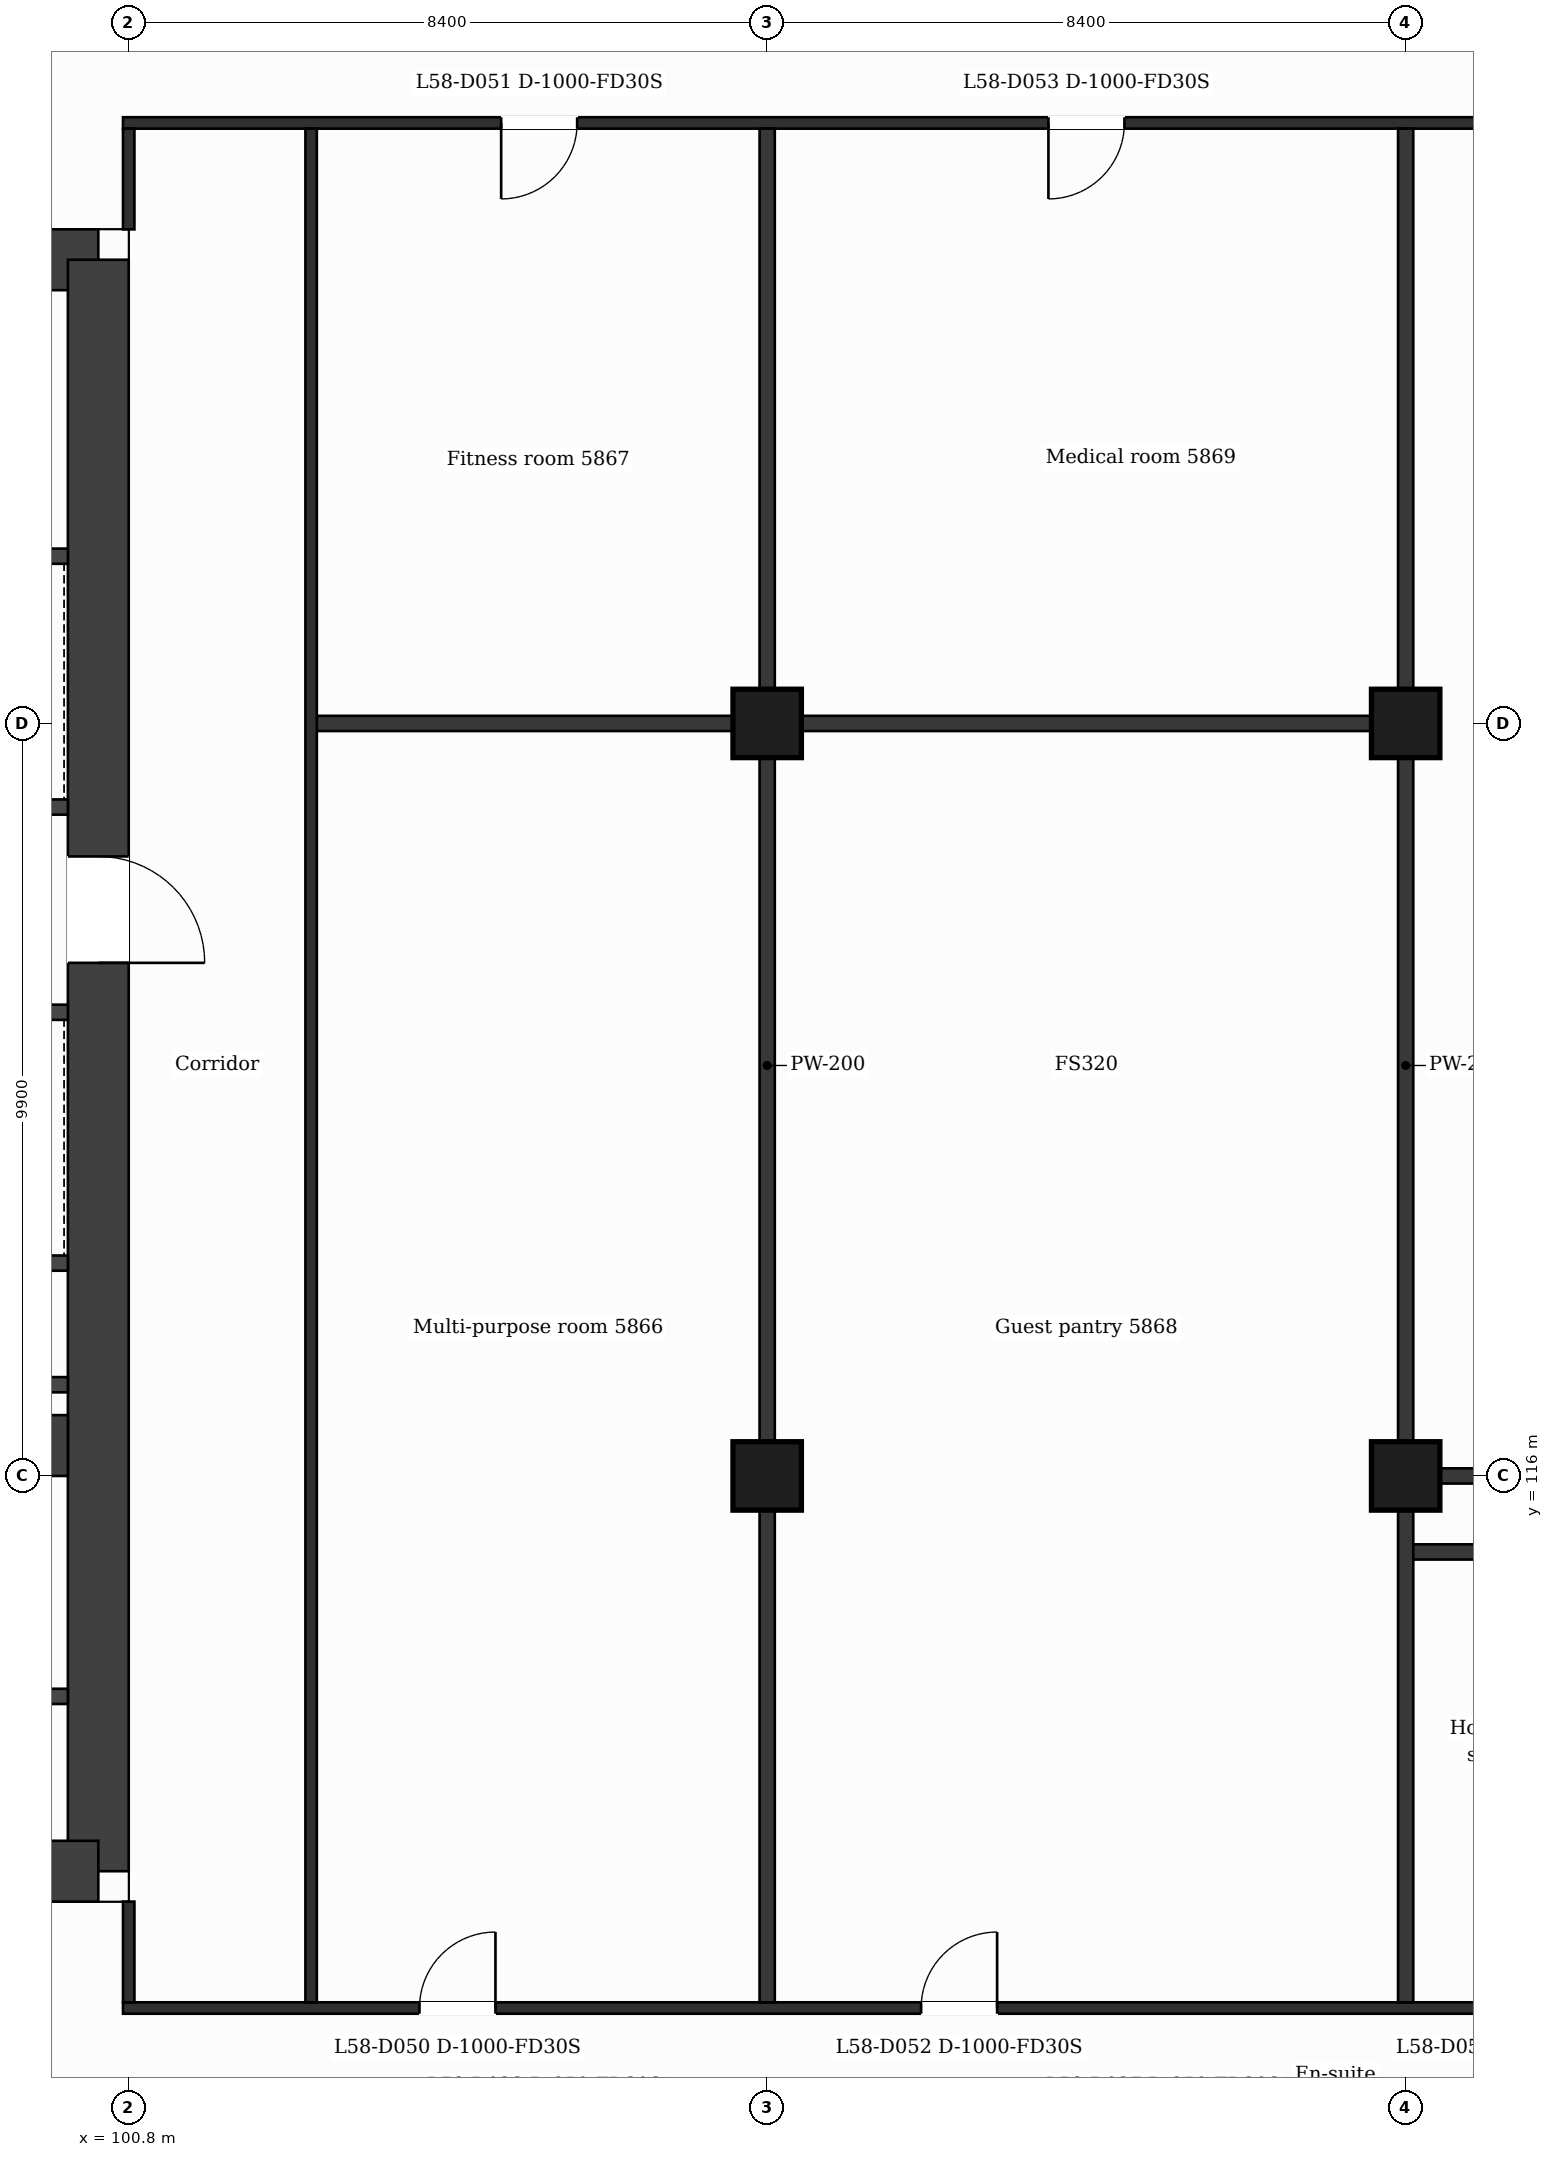
"""IFC4 building model, lengths in metres.
Left out: names, types, materials, properties, quantities, classifications, styles, units other than length and angle.
Written with IfcOpenShell. Run it as: python <this file> out.ifc"""

import sys

from ifc_helpers import new_model, si_unit, direction, frame, frame_2d, origin, origin_2d, place, context, subcontext, project, spatial, rectangle, extrude, element, fill, save


model = new_model("IFC4")
c1 = context("Model", 3, precision=1e-05, world=origin(), true_north=direction((0.0, 1.0)))
c2 = subcontext(c1, "Body", "Model", "MODEL_VIEW")
j1 = project(units=[si_unit("LENGTHUNIT", "METRE"), si_unit("PLANEANGLEUNIT", "RADIAN")], contexts=[c1])
p1 = place(None, origin())
s1 = spatial("IfcSite", under=j1, at=p1, CompositionType="ELEMENT")
p2 = place(p1, origin())
s2 = spatial("IfcBuilding", under=s1, at=p2, CompositionType="ELEMENT")
p3 = place(p2, frame((0.0, 0.0, 239.2)))
s3 = spatial("IfcBuildingStorey", under=s2, at=p3, CompositionType="ELEMENT", Elevation=239.2)
p4 = place(p3, frame((88.98, 132.0, 0.0), z_axis=(0.0, 0.0, 1.0), x_axis=(1.0, 0.0, 0.0)))
e1 = element("IfcWall", 1, at=p4, inside=s3, PredefinedType="SHEAR", context=c2, shape_type="SweptSolid", body=[
    extrude(rectangle(XDim=11.419, YDim=0.8, at=frame_2d((5.71, 0.0))), origin(), (0.0, 0.0, 1.0), 3.7),
])
p5 = place(p4, frame((6.833, 0.0, 0.0)))
e2 = element("IfcOpeningElement", 2, at=p5, cuts=e1, PredefinedType="OPENING", context=c2, shape_type="SweptSolid", body=[
    extrude(rectangle(XDim=1.2, YDim=2.1, at=frame_2d((0.6, 1.05))), frame((0.0, 0.41, 0.0), z_axis=(0.0, -1.0, 0.0), x_axis=(1.0, 0.0, 0.0)), (0.0, 0.0, 1.0), 0.82),
])
p6 = place(p3, frame((100.4, 132.0, 0.0), z_axis=(0.0, 0.0, 1.0), x_axis=(0.0, -1.0, 0.0)))
e3 = element("IfcWall", 3, at=p6, inside=s3, PredefinedType="SHEAR", context=c2, shape_type="SweptSolid", body=[
    extrude(rectangle(XDim=21.2, YDim=0.8, at=frame_2d((10.6, 0.0))), origin(), (0.0, 0.0, 1.0), 3.7),
])
p7 = place(p6, frame((7.85, 0.0, 0.0)))
e4 = element("IfcOpeningElement", 4, at=p7, cuts=e3, PredefinedType="OPENING", context=c2, shape_type="SweptSolid", body=[
    extrude(rectangle(XDim=1.4, YDim=2.1, at=frame_2d((0.7, 1.05))), frame((0.0, 0.41, 0.0), z_axis=(0.0, -1.0, 0.0), x_axis=(1.0, 0.0, 0.0)), (0.0, 0.0, 1.0), 0.82),
])
p8 = place(p3, frame((100.4, 110.8, 0.0), z_axis=(0.0, 0.0, 1.0), x_axis=(-1.0, 0.0, 0.0)))
e5 = element("IfcWall", 5, at=p8, inside=s3, PredefinedType="SHEAR", context=c2, shape_type="SweptSolid", body=[
    extrude(rectangle(XDim=14.273, YDim=0.8, at=frame_2d((7.137, 0.0))), origin(), (0.0, 0.0, 1.0), 3.7),
])
p9 = place(p8, frame((5.908, 0.0, 0.0)))
e6 = element("IfcOpeningElement", 6, at=p9, cuts=e5, PredefinedType="OPENING", context=c2, shape_type="SweptSolid", body=[
    extrude(rectangle(XDim=1.4, YDim=2.1, at=frame_2d((0.7, 1.05))), frame((0.0, 0.41, 0.0), z_axis=(0.0, -1.0, 0.0), x_axis=(1.0, 0.0, 0.0)), (0.0, 0.0, 1.0), 0.82),
])
p10 = place(p3, frame((94.7, 116.4, 0.0), z_axis=(0.0, 0.0, 1.0), x_axis=(1.0, 0.0, 0.0)))
e7 = element("IfcWall", 7, at=p10, inside=s3, PredefinedType="SHEAR", context=c2, shape_type="SweptSolid", body=[
    extrude(rectangle(XDim=5.3, YDim=0.8, at=frame_2d((2.65, 0.0))), origin(), (0.0, 0.0, 1.0), 3.7),
])
for number, where, z_axis, x_axis in (
    (8, (109.2, 116.0, 0.0), (0.0, 0.0, 1.0), (1.0, 0.0, 0.0)),
    (9, (117.6, 116.0, 0.0), (0.0, 0.0, 1.0), (1.0, 0.0, 0.0)),
    (10, (109.2, 125.9, 0.0), (0.0, 0.0, 1.0), (1.0, 0.0, 0.0)),
    (11, (117.6, 125.9, 0.0), (0.0, 0.0, 1.0), (1.0, 0.0, 0.0)),
):
    element("IfcColumn", number, at=place(p3, frame(where, z_axis=z_axis, x_axis=x_axis)), inside=s3, PredefinedType="COLUMN", context=c2, shape_type="SweptSolid", body=[
        extrude(rectangle(XDim=0.9, YDim=0.9, at=origin_2d()), origin(), (0.0, 0.0, 1.0), 3.7),
    ])
p11 = place(p3, frame((100.725, 109.0, 0.0), z_axis=(0.0, 0.0, 1.0), x_axis=(1.0, 0.0, 0.0)))
e12 = element("IfcWall", 12, at=p11, inside=s3, PredefinedType="PARTITIONING", context=c2, shape_type="SweptSolid", body=[
    extrude(rectangle(XDim=25.35, YDim=0.15, at=frame_2d((12.675, 0.0))), origin(), (0.0, 0.0, 1.0), 3.38),
])
p12 = place(p11, frame((21.2, 0.0, 0.0)))
e13 = element("IfcOpeningElement", 13, at=p12, cuts=e12, PredefinedType="OPENING", context=c2, shape_type="SweptSolid", body=[
    extrude(rectangle(XDim=1.0, YDim=2.1, at=frame_2d((0.5, 1.05))), frame((0.0, 0.085, 0.0), z_axis=(0.0, -1.0, 0.0), x_axis=(1.0, 0.0, 0.0)), (0.0, 0.0, 1.0), 0.17),
])
p13 = place(p11, frame((3.9, 0.0, 0.0)))
e14 = element("IfcOpeningElement", 14, at=p13, cuts=e12, PredefinedType="OPENING", context=c2, shape_type="SweptSolid", body=[
    extrude(rectangle(XDim=1.0, YDim=2.1, at=frame_2d((0.5, 1.05))), frame((0.0, 0.085, 0.0), z_axis=(0.0, -1.0, 0.0), x_axis=(1.0, 0.0, 0.0)), (0.0, 0.0, 1.0), 0.17),
])
p14 = place(p11, frame((10.5, 0.0, 0.0)))
e15 = element("IfcOpeningElement", 15, at=p14, cuts=e12, PredefinedType="OPENING", context=c2, shape_type="SweptSolid", body=[
    extrude(rectangle(XDim=1.0, YDim=2.1, at=frame_2d((0.5, 1.05))), frame((0.0, 0.085, 0.0), z_axis=(0.0, -1.0, 0.0), x_axis=(1.0, 0.0, 0.0)), (0.0, 0.0, 1.0), 0.17),
])
p15 = place(p11, frame((17.875, 0.0, 0.0)))
e16 = element("IfcOpeningElement", 16, at=p15, cuts=e12, PredefinedType="OPENING", context=c2, shape_type="SweptSolid", body=[
    extrude(rectangle(XDim=1.0, YDim=2.1, at=frame_2d((0.5, 1.05))), frame((0.0, 0.085, 0.0), z_axis=(0.0, -1.0, 0.0), x_axis=(1.0, 0.0, 0.0)), (0.0, 0.0, 1.0), 0.17),
])
p16 = place(p3, frame((95.127, 113.1, 0.0), z_axis=(0.0, 0.0, 1.0), x_axis=(1.0, 0.0, 0.0)))
e17 = element("IfcWall", 17, at=p16, inside=s3, PredefinedType="PARTITIONING", context=c2, shape_type="SweptSolid", body=[
    extrude(rectangle(XDim=4.873, YDim=0.2, at=frame_2d((2.437, 0.0))), origin(), (0.0, 0.0, 1.0), 3.38),
])
p17 = place(p16, frame((3.426, 0.0, 0.0)))
e18 = element("IfcOpeningElement", 18, at=p17, cuts=e17, PredefinedType="OPENING", context=c2, shape_type="SweptSolid", body=[
    extrude(rectangle(XDim=0.9, YDim=2.1, at=frame_2d((0.45, 1.05))), frame((0.0, 0.11, 0.0), z_axis=(0.0, -1.0, 0.0), x_axis=(1.0, 0.0, 0.0)), (0.0, 0.0, 1.0), 0.22),
])
p18 = place(p3, frame((117.6, 115.0, 0.0), z_axis=(0.0, 0.0, 1.0), x_axis=(1.0, 0.0, 0.0)))
e19 = element("IfcWall", 19, at=p18, inside=s3, PredefinedType="PARTITIONING", context=c2, shape_type="SweptSolid", body=[
    extrude(rectangle(XDim=3.1, YDim=0.2, at=frame_2d((1.55, 0.0))), origin(), (0.0, 0.0, 1.0), 3.38),
])
p19 = place(p3, frame((117.6, 116.0, 0.0), z_axis=(0.0, 0.0, 1.0), x_axis=(1.0, 0.0, 0.0)))
e20 = element("IfcWall", 20, at=p19, inside=s3, PredefinedType="PARTITIONING", context=c2, shape_type="SweptSolid", body=[
    extrude(rectangle(XDim=6.0, YDim=0.2, at=frame_2d((3.0, 0.0))), origin(), (0.0, 0.0, 1.0), 3.38),
])
for number, where, z_axis, x_axis in (
    (21, (95.227, 117.2, 0.0), (0.0, 0.0, 1.0), (1.0, 0.0, 0.0)),
    (22, (95.227, 118.8, 0.0), (0.0, 0.0, 1.0), (1.0, 0.0, 0.0)),
):
    element("IfcWall", number, at=place(p3, frame(where, z_axis=z_axis, x_axis=x_axis)), inside=s3, PredefinedType="PARTITIONING", context=c2, shape_type="SweptSolid", body=[
        extrude(rectangle(XDim=4.773, YDim=0.2, at=frame_2d((2.386, 0.0))), origin(), (0.0, 0.0, 1.0), 3.38),
    ])
p20 = place(p3, frame((95.227, 122.1, 0.0), z_axis=(0.0, 0.0, 1.0), x_axis=(1.0, 0.0, 0.0)))
e23 = element("IfcWall", 23, at=p20, inside=s3, PredefinedType="PARTITIONING", context=c2, shape_type="SweptSolid", body=[
    extrude(rectangle(XDim=4.773, YDim=0.2, at=frame_2d((2.386, 0.0))), origin(), (0.0, 0.0, 1.0), 3.38),
])
p21 = place(p20, frame((0.702, 0.0, 0.0)))
e24 = element("IfcOpeningElement", 24, at=p21, cuts=e23, PredefinedType="OPENING", context=c2, shape_type="SweptSolid", body=[
    extrude(rectangle(XDim=1.1, YDim=2.1, at=frame_2d((0.55, 1.05))), frame((0.0, 0.11, 0.0), z_axis=(0.0, -1.0, 0.0), x_axis=(1.0, 0.0, 0.0)), (0.0, 0.0, 1.0), 0.22),
])
p22 = place(p20, frame((2.971, 0.0, 0.0)))
e25 = element("IfcOpeningElement", 25, at=p22, cuts=e23, PredefinedType="OPENING", context=c2, shape_type="SweptSolid", body=[
    extrude(rectangle(XDim=1.1, YDim=2.1, at=frame_2d((0.55, 1.05))), frame((0.0, 0.11, 0.0), z_axis=(0.0, -1.0, 0.0), x_axis=(1.0, 0.0, 0.0)), (0.0, 0.0, 1.0), 0.22),
])
p23 = place(p3, frame((92.702, 124.8, 0.0), z_axis=(0.0, 0.0, 1.0), x_axis=(1.0, 0.0, 0.0)))
e26 = element("IfcWall", 26, at=p23, inside=s3, PredefinedType="PARTITIONING", context=c2, shape_type="SweptSolid", body=[
    extrude(rectangle(XDim=7.298, YDim=0.2, at=frame_2d((3.649, 0.0))), origin(), (0.0, 0.0, 1.0), 3.38),
])
p24 = place(p23, frame((5.7, 0.0, 0.0)))
e27 = element("IfcOpeningElement", 27, at=p24, cuts=e26, PredefinedType="OPENING", context=c2, shape_type="SweptSolid", body=[
    extrude(rectangle(XDim=1.1, YDim=2.1, at=frame_2d((0.55, 1.05))), frame((0.0, 0.11, 0.0), z_axis=(0.0, -1.0, 0.0), x_axis=(1.0, 0.0, 0.0)), (0.0, 0.0, 1.0), 0.22),
])
p25 = place(p3, frame((103.2, 125.9, 0.0), z_axis=(0.0, 0.0, 1.0), x_axis=(1.0, 0.0, 0.0)))
e28 = element("IfcWall", 28, at=p25, inside=s3, PredefinedType="PARTITIONING", context=c2, shape_type="SweptSolid", body=[
    extrude(rectangle(XDim=14.4, YDim=0.2, at=frame_2d((7.2, 0.0))), origin(), (0.0, 0.0, 1.0), 3.38),
])
p26 = place(p3, frame((92.827, 128.1, 0.0), z_axis=(0.0, 0.0, 1.0), x_axis=(1.0, 0.0, 0.0)))
e29 = element("IfcWall", 29, at=p26, inside=s3, PredefinedType="PARTITIONING", context=c2, shape_type="SweptSolid", body=[
    extrude(rectangle(XDim=7.173, YDim=0.2, at=frame_2d((3.586, 0.0))), origin(), (0.0, 0.0, 1.0), 3.38),
])
p27 = place(p26, frame((2.977, 0.0, 0.0)))
e30 = element("IfcOpeningElement", 30, at=p27, cuts=e29, PredefinedType="OPENING", context=c2, shape_type="SweptSolid", body=[
    extrude(rectangle(XDim=1.1, YDim=2.1, at=frame_2d((0.55, 1.05))), frame((0.0, 0.11, 0.0), z_axis=(0.0, -1.0, 0.0), x_axis=(1.0, 0.0, 0.0)), (0.0, 0.0, 1.0), 0.22),
])
p28 = place(p3, frame((100.725, 133.8, 0.0), z_axis=(0.0, 0.0, 1.0), x_axis=(1.0, 0.0, 0.0)))
e31 = element("IfcWall", 31, at=p28, inside=s3, PredefinedType="PARTITIONING", context=c2, shape_type="SweptSolid", body=[
    extrude(rectangle(XDim=25.35, YDim=0.15, at=frame_2d((12.675, 0.0))), origin(), (0.0, 0.0, 1.0), 3.38),
])
p29 = place(p28, frame((4.975, 0.0, 0.0)))
e32 = element("IfcOpeningElement", 32, at=p29, cuts=e31, PredefinedType="OPENING", context=c2, shape_type="SweptSolid", body=[
    extrude(rectangle(XDim=1.0, YDim=2.1, at=frame_2d((0.5, 1.05))), frame((0.0, 0.085, 0.0), z_axis=(0.0, -1.0, 0.0), x_axis=(1.0, 0.0, 0.0)), (0.0, 0.0, 1.0), 0.17),
])
p30 = place(p28, frame((12.175, 0.0, 0.0)))
e33 = element("IfcOpeningElement", 33, at=p30, cuts=e31, PredefinedType="OPENING", context=c2, shape_type="SweptSolid", body=[
    extrude(rectangle(XDim=1.0, YDim=2.1, at=frame_2d((0.5, 1.05))), frame((0.0, 0.085, 0.0), z_axis=(0.0, -1.0, 0.0), x_axis=(1.0, 0.0, 0.0)), (0.0, 0.0, 1.0), 0.17),
])
p31 = place(p28, frame((20.45, 0.0, 0.0)))
e34 = element("IfcOpeningElement", 34, at=p31, cuts=e31, PredefinedType="OPENING", context=c2, shape_type="SweptSolid", body=[
    extrude(rectangle(XDim=1.0, YDim=2.1, at=frame_2d((0.5, 1.05))), frame((0.0, 0.085, 0.0), z_axis=(0.0, -1.0, 0.0), x_axis=(1.0, 0.0, 0.0)), (0.0, 0.0, 1.0), 0.17),
])
p32 = place(p3, frame((100.8, 109.075, 0.0), z_axis=(0.0, 0.0, 1.0), x_axis=(0.0, 1.0, 0.0)))
e35 = element("IfcWall", 35, at=p32, inside=s3, PredefinedType="PARTITIONING", context=c2, shape_type="SweptSolid", body=[
    extrude(rectangle(XDim=1.325, YDim=0.15, at=frame_2d((0.663, 0.0))), origin(), (0.0, 0.0, 1.0), 3.38),
])
p33 = place(p3, frame((100.8, 132.4, 0.0), z_axis=(0.0, 0.0, 1.0), x_axis=(0.0, 1.0, 0.0)))
e36 = element("IfcWall", 36, at=p33, inside=s3, PredefinedType="PARTITIONING", context=c2, shape_type="SweptSolid", body=[
    extrude(rectangle(XDim=1.325, YDim=0.15, at=frame_2d((0.663, 0.0))), origin(), (0.0, 0.0, 1.0), 3.38),
])
p34 = place(p3, frame((103.2, 109.075, 0.0), z_axis=(0.0, 0.0, 1.0), x_axis=(0.0, 1.0, 0.0)))
e37 = element("IfcWall", 37, at=p34, inside=s3, PredefinedType="PARTITIONING", context=c2, shape_type="SweptSolid", body=[
    extrude(rectangle(XDim=24.65, YDim=0.15, at=frame_2d((12.325, 0.0))), origin(), (0.0, 0.0, 1.0), 3.38),
])
for number, where, z_axis, x_axis in (
    (38, (109.2, 109.075, 0.0), (0.0, 0.0, 1.0), (0.0, 1.0, 0.0)),
    (39, (117.6, 109.075, 0.0), (0.0, 0.0, 1.0), (0.0, 1.0, 0.0)),
):
    element("IfcWall", number, at=place(p3, frame(where, z_axis=z_axis, x_axis=x_axis)), inside=s3, PredefinedType="PARTITIONING", context=c2, shape_type="SweptSolid", body=[
        extrude(rectangle(XDim=24.65, YDim=0.2, at=frame_2d((12.325, 0.0))), origin(), (0.0, 0.0, 1.0), 3.38),
    ])
p35 = place(p13, origin())
e40 = element("IfcDoor", 40, at=p35, inside=s3, OperationType="SINGLE_SWING_RIGHT", PredefinedType="DOOR", context=c2, shape_type="SweptSolid", body=[
    extrude(rectangle(XDim=1.0, YDim=2.1, at=frame_2d((0.5, 1.05))), frame((0.0, 0.025, 0.0), z_axis=(0.0, -1.0, 0.0), x_axis=(1.0, 0.0, 0.0)), (0.0, 0.0, 1.0), 0.05),
])
fill(e14, e40)
p36 = place(p29, origin())
e41 = element("IfcDoor", 41, at=p36, inside=s3, OperationType="SINGLE_SWING_LEFT", PredefinedType="DOOR", context=c2, shape_type="SweptSolid", body=[
    extrude(rectangle(XDim=1.0, YDim=2.1, at=frame_2d((0.5, 1.05))), frame((0.0, 0.025, 0.0), z_axis=(0.0, -1.0, 0.0), x_axis=(1.0, 0.0, 0.0)), (0.0, 0.0, 1.0), 0.05),
])
fill(e32, e41)
p37 = place(p14, origin())
e42 = element("IfcDoor", 42, at=p37, inside=s3, OperationType="SINGLE_SWING_RIGHT", PredefinedType="DOOR", context=c2, shape_type="SweptSolid", body=[
    extrude(rectangle(XDim=1.0, YDim=2.1, at=frame_2d((0.5, 1.05))), frame((0.0, 0.025, 0.0), z_axis=(0.0, -1.0, 0.0), x_axis=(1.0, 0.0, 0.0)), (0.0, 0.0, 1.0), 0.05),
])
fill(e15, e42)
p38 = place(p30, origin())
e43 = element("IfcDoor", 43, at=p38, inside=s3, OperationType="SINGLE_SWING_LEFT", PredefinedType="DOOR", context=c2, shape_type="SweptSolid", body=[
    extrude(rectangle(XDim=1.0, YDim=2.1, at=frame_2d((0.5, 1.05))), frame((0.0, 0.025, 0.0), z_axis=(0.0, -1.0, 0.0), x_axis=(1.0, 0.0, 0.0)), (0.0, 0.0, 1.0), 0.05),
])
fill(e33, e43)
p39 = place(p7, origin())
e44 = element("IfcDoor", 44, at=p39, inside=s3, OperationType="SINGLE_SWING_RIGHT", PredefinedType="DOOR", context=c2, shape_type="SweptSolid", body=[
    extrude(rectangle(XDim=1.4, YDim=2.1, at=frame_2d((0.7, 1.05))), frame((0.0, 0.025, 0.0), z_axis=(0.0, -1.0, 0.0), x_axis=(1.0, 0.0, 0.0)), (0.0, 0.0, 1.0), 0.05),
])
fill(e4, e44)
save(model, sys.argv[1])
